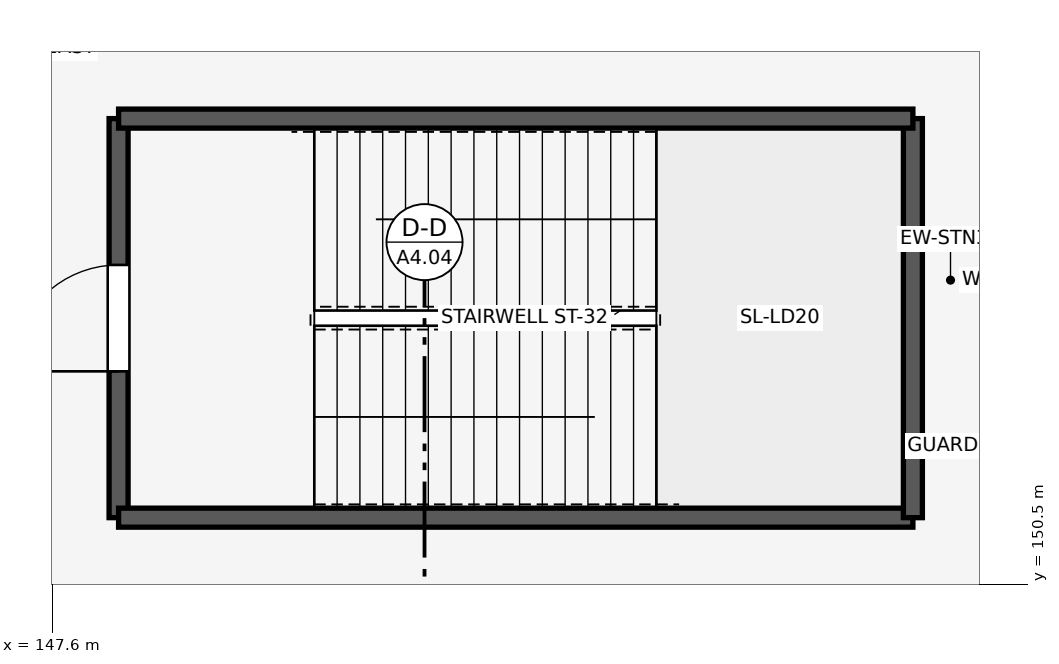
"""IFC4 building model, lengths in metres.
Left out: names, types, materials, properties, quantities, classifications, styles, units other than length and angle.
Written with IfcOpenShell. Run it as: python <this file> out.ifc"""

import sys

from ifc_helpers import new_model, si_unit, direction, frame, frame_2d, origin, place, context, subcontext, project, spatial, rectangle, extrude, element, fill, save


model = new_model("IFC4")
c1 = context("Model", 3, precision=1e-05, world=origin(), true_north=direction((0.0, 1.0)))
c2 = subcontext(c1, "Body", "Model", "MODEL_VIEW")
j1 = project(units=[si_unit("LENGTHUNIT", "METRE"), si_unit("PLANEANGLEUNIT", "RADIAN")], contexts=[c1])
p1 = place(None, origin())
s1 = spatial("IfcSite", under=j1, at=p1, CompositionType="ELEMENT")
p2 = place(p1, origin())
s2 = spatial("IfcBuilding", under=s1, at=p2, CompositionType="ELEMENT")
p3 = place(p2, frame((0.0, 0.0, 10.6)))
s3 = spatial("IfcBuildingStorey", under=s2, at=p3, CompositionType="ELEMENT", Elevation=10.6)
p4 = place(p3, frame((148.475, 156.625, 0.0), z_axis=(0.0, 0.0, 1.0), x_axis=(0.0, -1.0, 0.0)))
e1 = element("IfcWall", 1, at=p4, inside=s3, PredefinedType="SHEAR", context=c2, shape_type="SweptSolid", body=[
    extrude(rectangle(XDim=5.25, YDim=0.25, at=frame_2d((2.625, 0.0))), origin(), (0.0, 0.0, 1.0), 4.72),
])
p5 = place(p4, frame((1.925, 0.0, 0.0)))
e2 = element("IfcOpeningElement", 2, at=p5, cuts=e1, PredefinedType="OPENING", context=c2, shape_type="SweptSolid", body=[
    extrude(rectangle(XDim=1.4, YDim=2.2, at=frame_2d((0.7, 1.1))), frame((0.0, 0.135, 0.0), z_axis=(0.0, -1.0, 0.0), x_axis=(1.0, 0.0, 0.0)), (0.0, 0.0, 1.0), 0.27),
])
p6 = place(p3, frame((148.475, 151.375, 0.0), z_axis=(0.0, 0.0, 1.0), x_axis=(1.0, 0.0, 0.0)))
e3 = element("IfcWall", 3, at=p6, inside=s3, PredefinedType="SHEAR", context=c2, shape_type="SweptSolid", body=[
    extrude(rectangle(XDim=10.45, YDim=0.25, at=frame_2d((5.225, 0.0))), origin(), (0.0, 0.0, 1.0), 4.72),
])
p7 = place(p3, frame((158.925, 151.375, 0.0), z_axis=(0.0, 0.0, 1.0), x_axis=(0.0, 1.0, 0.0)))
e4 = element("IfcWall", 4, at=p7, inside=s3, PredefinedType="SHEAR", context=c2, shape_type="SweptSolid", body=[
    extrude(rectangle(XDim=5.25, YDim=0.25, at=frame_2d((2.625, 0.0))), origin(), (0.0, 0.0, 1.0), 4.72),
])
p8 = place(p3, frame((158.925, 156.625, 0.0), z_axis=(0.0, 0.0, 1.0), x_axis=(-1.0, 0.0, 0.0)))
e5 = element("IfcWall", 5, at=p8, inside=s3, PredefinedType="SHEAR", context=c2, shape_type="SweptSolid", body=[
    extrude(rectangle(XDim=10.45, YDim=0.25, at=frame_2d((5.225, 0.0))), origin(), (0.0, 0.0, 1.0), 4.72),
])
p9 = place(p5, frame((1.4, 0.0, 0.0), z_axis=(0.0, 0.0, 1.0), x_axis=(-1.0, 0.0, 0.0)))
e6 = element("IfcDoor", 6, at=p9, inside=s3, OperationType="SINGLE_SWING_LEFT", PredefinedType="DOOR", context=c2, shape_type="SweptSolid", body=[
    extrude(rectangle(XDim=1.4, YDim=2.2, at=frame_2d((0.7, 1.1))), frame((0.0, 0.025, 0.0), z_axis=(0.0, -1.0, 0.0), x_axis=(1.0, 0.0, 0.0)), (0.0, 0.0, 1.0), 0.05),
])
fill(e2, e6)
save(model, sys.argv[1])
